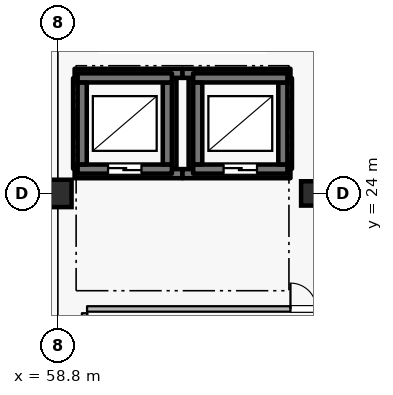
"""IFC4 building model, lengths in metres.
Left out: names, types, materials, properties, quantities, classifications, styles, units other than length and angle.
Written with IfcOpenShell. Run it as: python <this file> out.ifc"""

import sys

from ifc_helpers import new_model, si_unit, direction, frame, frame_2d, origin, origin_2d, place, context, subcontext, project, spatial, rectangle, extrude, element, fill, save


model = new_model("IFC4")
c1 = context("Model", 3, precision=1e-05, world=origin(), true_north=direction((0.0, 1.0)))
c2 = subcontext(c1, "Body", "Model", "MODEL_VIEW")
j1 = project(units=[si_unit("LENGTHUNIT", "METRE"), si_unit("PLANEANGLEUNIT", "RADIAN")], contexts=[c1])
p1 = place(None, origin())
s1 = spatial("IfcSite", under=j1, at=p1, CompositionType="ELEMENT")
p2 = place(p1, origin())
s2 = spatial("IfcBuilding", under=s1, at=p2, CompositionType="ELEMENT")
p3 = place(p2, frame((0.0, 0.0, -5.4)))
s3 = spatial("IfcBuildingStorey", under=s2, at=p3, CompositionType="ELEMENT", Elevation=-5.4)
p4 = place(p3, frame((58.8, 24.0, 0.0), z_axis=(0.0, 0.0, 1.0), x_axis=(1.0, 0.0, 0.0)))
e1 = element("IfcColumn", 1, at=p4, inside=s3, PredefinedType="COLUMN", context=c2, shape_type="SweptSolid", body=[
    extrude(rectangle(XDim=0.9, YDim=0.9, at=origin_2d()), origin(), (0.0, 0.0, 1.0), 5.4),
])
p5 = place(p3, frame((67.2, 24.0, 0.0), z_axis=(0.0, 0.0, 1.0), x_axis=(1.0, 0.0, 0.0)))
e2 = element("IfcColumn", 2, at=p5, inside=s3, PredefinedType="COLUMN", context=c2, shape_type="SweptSolid", body=[
    extrude(rectangle(XDim=0.8, YDim=0.8, at=origin_2d()), origin(), (0.0, 0.0, 1.0), 5.4),
])
p6 = place(p3, frame((59.35, 24.65, -1.4), z_axis=(0.0, 0.0, 1.0), x_axis=(1.0, 0.0, 0.0)))
e3 = element("IfcWall", 3, at=p6, inside=s3, PredefinedType="USERDEFINED", context=c2, shape_type="SweptSolid", body=[
    extrude(rectangle(XDim=3.55, YDim=0.3, at=frame_2d((1.775, 0.0))), origin(), (0.0, 0.0, 1.0), 1.4),
])
p7 = place(p3, frame((62.55, 24.81, -1.4), z_axis=(0.0, 0.0, 1.0), x_axis=(0.0, 1.0, 0.0)))
e4 = element("IfcWall", 4, at=p7, inside=s3, PredefinedType="USERDEFINED", context=c2, shape_type="SweptSolid", body=[
    extrude(rectangle(XDim=2.98, YDim=0.3, at=frame_2d((1.49, 0.0))), origin(), (0.0, 0.0, 1.0), 1.4),
])
p8 = place(p3, frame((62.9, 27.95, -1.4), z_axis=(0.0, 0.0, 1.0), x_axis=(-1.0, 0.0, 0.0)))
e5 = element("IfcWall", 5, at=p8, inside=s3, PredefinedType="USERDEFINED", context=c2, shape_type="SweptSolid", body=[
    extrude(rectangle(XDim=3.55, YDim=0.3, at=frame_2d((1.775, 0.0))), origin(), (0.0, 0.0, 1.0), 1.4),
])
p9 = place(p3, frame((59.45, 27.79, -1.4), z_axis=(0.0, 0.0, 1.0), x_axis=(0.0, -1.0, 0.0)))
e6 = element("IfcWall", 6, at=p9, inside=s3, PredefinedType="USERDEFINED", context=c2, shape_type="SweptSolid", body=[
    extrude(rectangle(XDim=2.98, YDim=0.3, at=frame_2d((1.49, 0.0))), origin(), (0.0, 0.0, 1.0), 1.4),
])
p10 = place(p3, frame((62.9, 24.65, -1.4), z_axis=(0.0, 0.0, 1.0), x_axis=(1.0, 0.0, 0.0)))
e7 = element("IfcWall", 7, at=p10, inside=s3, PredefinedType="USERDEFINED", context=c2, shape_type="SweptSolid", body=[
    extrude(rectangle(XDim=3.55, YDim=0.3, at=frame_2d((1.775, 0.0))), origin(), (0.0, 0.0, 1.0), 1.4),
])
p11 = place(p3, frame((66.35, 24.81, -1.4), z_axis=(0.0, 0.0, 1.0), x_axis=(0.0, 1.0, 0.0)))
e8 = element("IfcWall", 8, at=p11, inside=s3, PredefinedType="USERDEFINED", context=c2, shape_type="SweptSolid", body=[
    extrude(rectangle(XDim=2.98, YDim=0.3, at=frame_2d((1.49, 0.0))), origin(), (0.0, 0.0, 1.0), 1.4),
])
p12 = place(p3, frame((66.45, 27.95, -1.4), z_axis=(0.0, 0.0, 1.0), x_axis=(-1.0, 0.0, 0.0)))
e9 = element("IfcWall", 9, at=p12, inside=s3, PredefinedType="USERDEFINED", context=c2, shape_type="SweptSolid", body=[
    extrude(rectangle(XDim=3.55, YDim=0.3, at=frame_2d((1.775, 0.0))), origin(), (0.0, 0.0, 1.0), 1.4),
])
p13 = place(p3, frame((63.25, 27.79, -1.4), z_axis=(0.0, 0.0, 1.0), x_axis=(0.0, -1.0, 0.0)))
e10 = element("IfcWall", 10, at=p13, inside=s3, PredefinedType="USERDEFINED", context=c2, shape_type="SweptSolid", body=[
    extrude(rectangle(XDim=2.98, YDim=0.3, at=frame_2d((1.49, 0.0))), origin(), (0.0, 0.0, 1.0), 1.4),
])
p14 = place(p3, frame((59.45, 24.8, 0.0), z_axis=(0.0, 0.0, 1.0), x_axis=(1.0, 0.0, 0.0)))
e11 = element("IfcWall", 11, at=p14, inside=s3, PredefinedType="SHEAR", context=c2, shape_type="SweptSolid", body=[
    extrude(rectangle(XDim=3.1, YDim=0.3, at=frame_2d((1.55, 0.0))), origin(), (0.0, 0.0, 1.0), 4.995),
])
p15 = place(p14, frame((1.0, 0.0, 0.0)))
e12 = element("IfcOpeningElement", 12, at=p15, cuts=e11, PredefinedType="OPENING", context=c2, shape_type="SweptSolid", body=[
    extrude(rectangle(XDim=1.1, YDim=2.2, at=frame_2d((0.55, 1.1))), frame((0.0, 0.16, 0.0), z_axis=(0.0, -1.0, 0.0), x_axis=(1.0, 0.0, 0.0)), (0.0, 0.0, 1.0), 0.32),
])
p16 = place(p3, frame((62.4, 24.955, 0.0), z_axis=(0.0, 0.0, 1.0), x_axis=(0.0, 1.0, 0.0)))
e13 = element("IfcWall", 13, at=p16, inside=s3, PredefinedType="SHEAR", context=c2, shape_type="SweptSolid", body=[
    extrude(rectangle(XDim=2.69, YDim=0.3, at=frame_2d((1.345, 0.0))), origin(), (0.0, 0.0, 1.0), 4.995),
])
p17 = place(p3, frame((62.55, 27.8, 0.0), z_axis=(0.0, 0.0, 1.0), x_axis=(-1.0, 0.0, 0.0)))
e14 = element("IfcWall", 14, at=p17, inside=s3, PredefinedType="SHEAR", context=c2, shape_type="SweptSolid", body=[
    extrude(rectangle(XDim=3.1, YDim=0.3, at=frame_2d((1.55, 0.0))), origin(), (0.0, 0.0, 1.0), 4.995),
])
p18 = place(p3, frame((59.6, 27.645, 0.0), z_axis=(0.0, 0.0, 1.0), x_axis=(0.0, -1.0, 0.0)))
e15 = element("IfcWall", 15, at=p18, inside=s3, PredefinedType="SHEAR", context=c2, shape_type="SweptSolid", body=[
    extrude(rectangle(XDim=2.69, YDim=0.3, at=frame_2d((1.345, 0.0))), origin(), (0.0, 0.0, 1.0), 4.995),
])
p19 = place(p3, frame((63.25, 24.8, 0.0), z_axis=(0.0, 0.0, 1.0), x_axis=(1.0, 0.0, 0.0)))
e16 = element("IfcWall", 16, at=p19, inside=s3, PredefinedType="SHEAR", context=c2, shape_type="SweptSolid", body=[
    extrude(rectangle(XDim=3.1, YDim=0.3, at=frame_2d((1.55, 0.0))), origin(), (0.0, 0.0, 1.0), 4.995),
])
p20 = place(p19, frame((1.0, 0.0, 0.0)))
e17 = element("IfcOpeningElement", 17, at=p20, cuts=e16, PredefinedType="OPENING", context=c2, shape_type="SweptSolid", body=[
    extrude(rectangle(XDim=1.1, YDim=2.2, at=frame_2d((0.55, 1.1))), frame((0.0, 0.16, 0.0), z_axis=(0.0, -1.0, 0.0), x_axis=(1.0, 0.0, 0.0)), (0.0, 0.0, 1.0), 0.32),
])
p21 = place(p3, frame((66.2, 24.955, 0.0), z_axis=(0.0, 0.0, 1.0), x_axis=(0.0, 1.0, 0.0)))
e18 = element("IfcWall", 18, at=p21, inside=s3, PredefinedType="SHEAR", context=c2, shape_type="SweptSolid", body=[
    extrude(rectangle(XDim=2.69, YDim=0.3, at=frame_2d((1.345, 0.0))), origin(), (0.0, 0.0, 1.0), 4.995),
])
p22 = place(p3, frame((66.35, 27.8, 0.0), z_axis=(0.0, 0.0, 1.0), x_axis=(-1.0, 0.0, 0.0)))
e19 = element("IfcWall", 19, at=p22, inside=s3, PredefinedType="SHEAR", context=c2, shape_type="SweptSolid", body=[
    extrude(rectangle(XDim=3.1, YDim=0.3, at=frame_2d((1.55, 0.0))), origin(), (0.0, 0.0, 1.0), 4.995),
])
p23 = place(p3, frame((63.4, 27.645, 0.0), z_axis=(0.0, 0.0, 1.0), x_axis=(0.0, -1.0, 0.0)))
e20 = element("IfcWall", 20, at=p23, inside=s3, PredefinedType="SHEAR", context=c2, shape_type="SweptSolid", body=[
    extrude(rectangle(XDim=2.69, YDim=0.3, at=frame_2d((1.345, 0.0))), origin(), (0.0, 0.0, 1.0), 4.995),
])
p24 = place(p3, frame((59.76, 20.2, 0.0), z_axis=(0.0, 0.0, 1.0), x_axis=(1.0, 0.0, 0.0)))
e21 = element("IfcWall", 21, at=p24, inside=s3, PredefinedType="PARTITIONING", context=c2, shape_type="SweptSolid", body=[
    extrude(rectangle(XDim=15.08, YDim=0.18, at=frame_2d((7.54, 0.0))), origin(), (0.0, 0.0, 1.0), 4.995),
])
p25 = place(p24, frame((6.69, 0.0, 0.0)))
e22 = element("IfcOpeningElement", 22, at=p25, cuts=e21, PredefinedType="OPENING", context=c2, shape_type="SweptSolid", body=[
    extrude(rectangle(XDim=1.7, YDim=2.3, at=frame_2d((0.85, 1.15))), frame((0.0, 0.1, 0.0), z_axis=(0.0, -1.0, 0.0), x_axis=(1.0, 0.0, 0.0)), (0.0, 0.0, 1.0), 0.2),
])
p26 = place(p3, frame((59.68, 9.25, 0.0), z_axis=(0.0, 0.0, 1.0), x_axis=(0.0, 1.0, 0.0)))
e23 = element("IfcWall", 23, at=p26, inside=s3, PredefinedType="PARTITIONING", context=c2, shape_type="SweptSolid", body=[
    extrude(rectangle(XDim=10.81, YDim=0.18, at=frame_2d((5.405, 0.0))), origin(), (0.0, 0.0, 1.0), 4.995),
])
p27 = place(p15, origin())
e24 = element("IfcDoor", 24, at=p27, inside=s3, OperationType="DOUBLE_DOOR_SLIDING", PredefinedType="DOOR", context=c2, shape_type="SweptSolid", body=[
    extrude(rectangle(XDim=1.1, YDim=2.2, at=frame_2d((0.55, 1.1))), frame((0.0, 0.025, 0.0), z_axis=(0.0, -1.0, 0.0), x_axis=(1.0, 0.0, 0.0)), (0.0, 0.0, 1.0), 0.05),
])
fill(e12, e24)
p28 = place(p20, origin())
e25 = element("IfcDoor", 25, at=p28, inside=s3, OperationType="DOUBLE_DOOR_SLIDING", PredefinedType="DOOR", context=c2, shape_type="SweptSolid", body=[
    extrude(rectangle(XDim=1.1, YDim=2.2, at=frame_2d((0.55, 1.1))), frame((0.0, 0.025, 0.0), z_axis=(0.0, -1.0, 0.0), x_axis=(1.0, 0.0, 0.0)), (0.0, 0.0, 1.0), 0.05),
])
fill(e17, e25)
p29 = place(p25, origin())
e26 = element("IfcDoor", 26, at=p29, inside=s3, OperationType="DOUBLE_DOOR_SINGLE_SWING", PredefinedType="DOOR", context=c2, shape_type="SweptSolid", body=[
    extrude(rectangle(XDim=1.7, YDim=2.3, at=frame_2d((0.85, 1.15))), frame((0.0, 0.025, 0.0), z_axis=(0.0, -1.0, 0.0), x_axis=(1.0, 0.0, 0.0)), (0.0, 0.0, 1.0), 0.05),
])
fill(e22, e26)
save(model, sys.argv[1])
